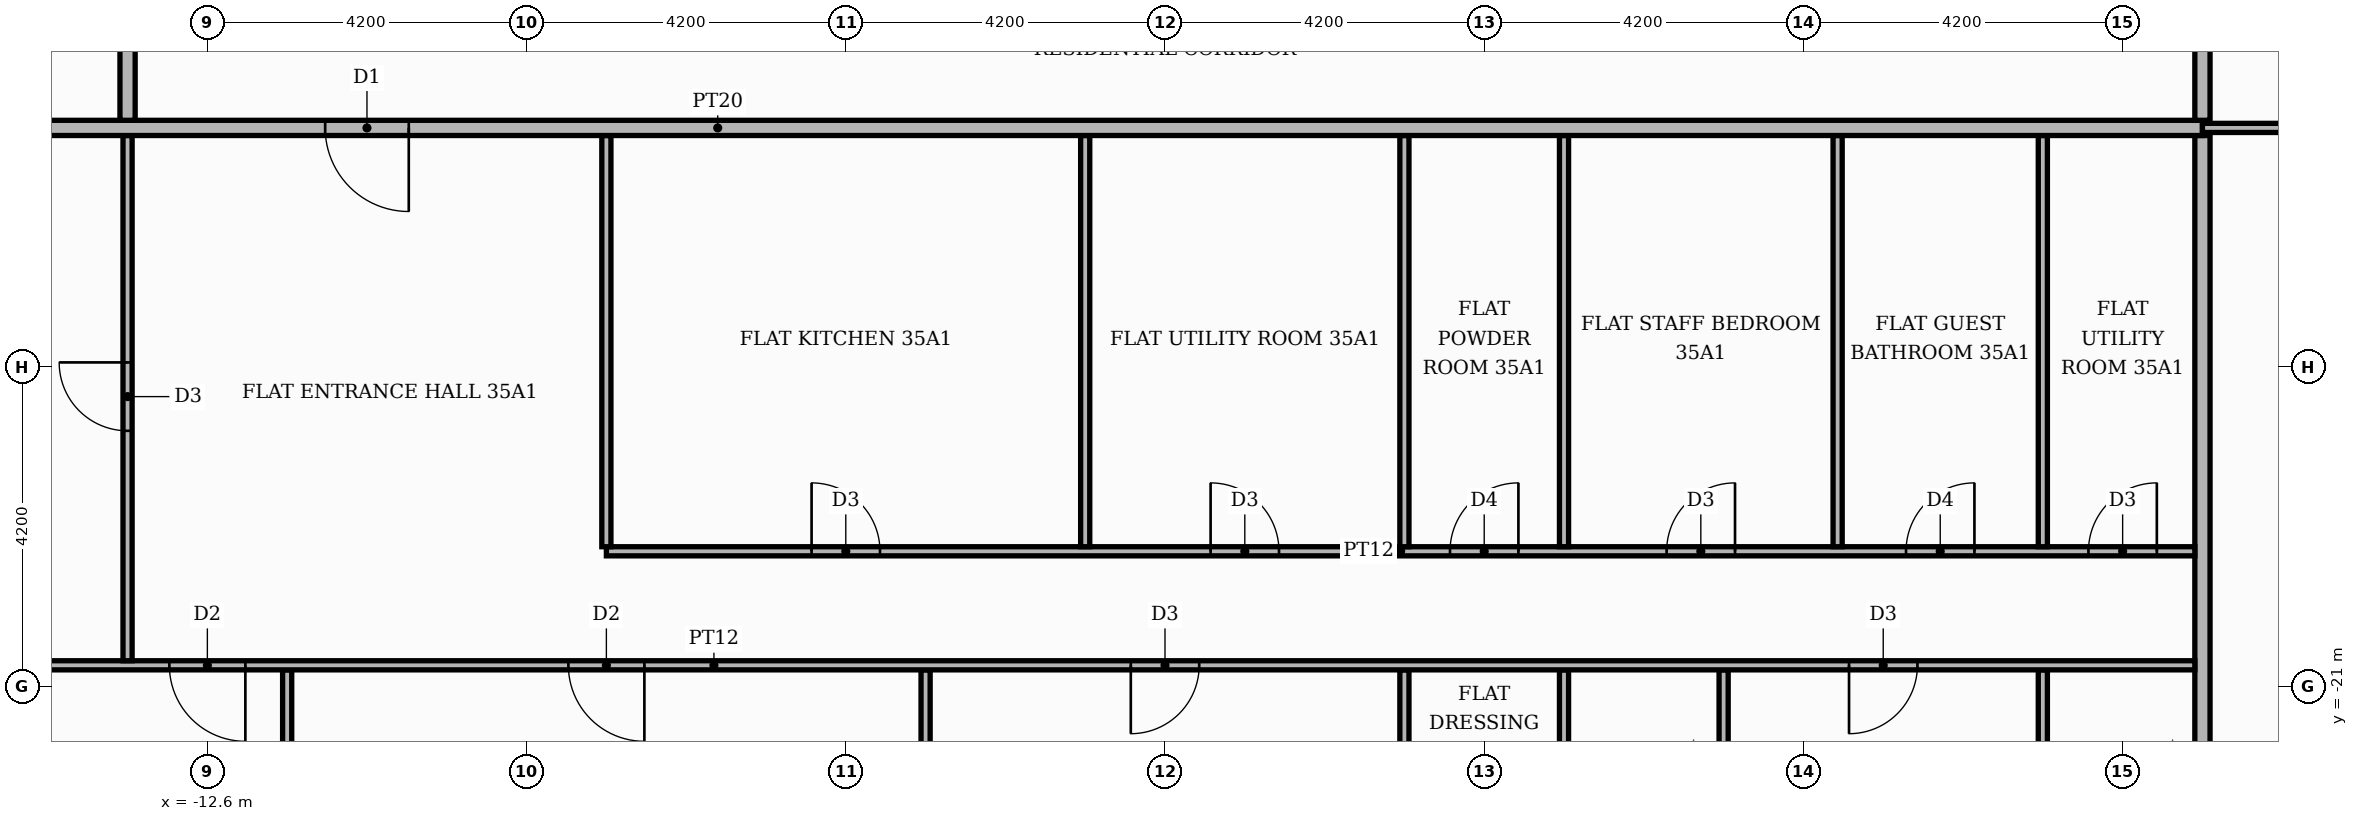
"""IFC4 building model, lengths in metres.
Left out: names, types, materials, properties, quantities, classifications, styles, units other than length and angle.
Written with IfcOpenShell. Run it as: python <this file> out.ifc"""

import sys

from ifc_helpers import new_model, si_unit, direction, frame, frame_2d, origin, place, context, subcontext, project, spatial, rectangle, extrude, element, fill, save


model = new_model("IFC4")
c1 = context("Model", 3, precision=1e-05, world=origin(), true_north=direction((0.0, 1.0)))
c2 = subcontext(c1, "Body", "Model", "MODEL_VIEW")
j1 = project(units=[si_unit("LENGTHUNIT", "METRE"), si_unit("PLANEANGLEUNIT", "RADIAN")], contexts=[c1])
p1 = place(None, origin())
s1 = spatial("IfcSite", under=j1, at=p1, CompositionType="ELEMENT")
p2 = place(p1, origin())
s2 = spatial("IfcBuilding", under=s1, at=p2, CompositionType="ELEMENT")
p3 = place(p2, frame((0.0, 0.0, 149.4)))
s3 = spatial("IfcBuildingStorey", under=s2, at=p3, CompositionType="ELEMENT", Elevation=149.4)
for number, where, z_axis, x_axis in (
    (1, (-11.55, -25.42, 0.0), (0.0, 0.0, 1.0), (0.0, 1.0, 0.0)),
    (2, (-3.15, -25.42, 0.0), (0.0, 0.0, 1.0), (0.0, 1.0, 0.0)),
):
    element("IfcWall", number, at=place(p3, frame(where, z_axis=z_axis, x_axis=x_axis)), inside=s3, PredefinedType="PARTITIONING", context=c2, shape_type="SweptSolid", body=[
        extrude(rectangle(XDim=4.64, YDim=0.12, at=frame_2d((2.32, 0.0))), origin(), (0.0, 0.0, 1.0), 3.48),
    ])
p4 = place(p3, frame((3.15, -25.42, 0.0), z_axis=(0.0, 0.0, 1.0), x_axis=(0.0, 1.0, 0.0)))
e3 = element("IfcWall", 3, at=p4, inside=s3, PredefinedType="PARTITIONING", context=c2, shape_type="SweptSolid", body=[
    extrude(rectangle(XDim=4.64, YDim=0.12, at=frame_2d((2.32, 0.0))), origin(), (0.0, 0.0, 1.0), 3.48),
])
p5 = place(p4, frame((1.75, 0.0, 0.0)))
e4 = element("IfcOpeningElement", 4, at=p5, cuts=e3, PredefinedType="OPENING", context=c2, shape_type="SweptSolid", body=[
    extrude(rectangle(XDim=0.9, YDim=2.1, at=frame_2d((0.45, 1.05))), frame((0.0, 0.07, 0.0), z_axis=(0.0, -1.0, 0.0), x_axis=(1.0, 0.0, 0.0)), (0.0, 0.0, 1.0), 0.14),
])
p6 = place(p3, frame((5.25, -25.42, 0.0), z_axis=(0.0, 0.0, 1.0), x_axis=(0.0, 1.0, 0.0)))
e5 = element("IfcWall", 5, at=p6, inside=s3, PredefinedType="PARTITIONING", context=c2, shape_type="SweptSolid", body=[
    extrude(rectangle(XDim=4.64, YDim=0.12, at=frame_2d((2.32, 0.0))), origin(), (0.0, 0.0, 1.0), 3.48),
])
p7 = place(p6, frame((1.75, 0.0, 0.0)))
e6 = element("IfcOpeningElement", 6, at=p7, cuts=e5, PredefinedType="OPENING", context=c2, shape_type="SweptSolid", body=[
    extrude(rectangle(XDim=0.9, YDim=2.1, at=frame_2d((0.45, 1.05))), frame((0.0, 0.07, 0.0), z_axis=(0.0, -1.0, 0.0), x_axis=(1.0, 0.0, 0.0)), (0.0, 0.0, 1.0), 0.14),
])
p8 = place(p3, frame((7.35, -25.42, 0.0), z_axis=(0.0, 0.0, 1.0), x_axis=(0.0, 1.0, 0.0)))
e7 = element("IfcWall", 7, at=p8, inside=s3, PredefinedType="PARTITIONING", context=c2, shape_type="SweptSolid", body=[
    extrude(rectangle(XDim=4.64, YDim=0.12, at=frame_2d((2.32, 0.0))), origin(), (0.0, 0.0, 1.0), 3.48),
])
p9 = place(p3, frame((11.55, -25.42, 0.0), z_axis=(0.0, 0.0, 1.0), x_axis=(0.0, 1.0, 0.0)))
e8 = element("IfcWall", 8, at=p9, inside=s3, PredefinedType="PARTITIONING", context=c2, shape_type="SweptSolid", body=[
    extrude(rectangle(XDim=4.64, YDim=0.12, at=frame_2d((2.32, 0.0))), origin(), (0.0, 0.0, 1.0), 3.48),
])
p10 = place(p9, frame((1.75, 0.0, 0.0)))
e9 = element("IfcOpeningElement", 9, at=p10, cuts=e8, PredefinedType="OPENING", context=c2, shape_type="SweptSolid", body=[
    extrude(rectangle(XDim=0.9, YDim=2.1, at=frame_2d((0.45, 1.05))), frame((0.0, 0.07, 0.0), z_axis=(0.0, -1.0, 0.0), x_axis=(1.0, 0.0, 0.0)), (0.0, 0.0, 1.0), 0.14),
])
p11 = place(p3, frame((13.65, -25.42, 0.0), z_axis=(0.0, 0.0, 1.0), x_axis=(0.0, 1.0, 0.0)))
e10 = element("IfcWall", 10, at=p11, inside=s3, PredefinedType="PARTITIONING", context=c2, shape_type="SweptSolid", body=[
    extrude(rectangle(XDim=11.67, YDim=0.2, at=frame_2d((5.835, 0.0))), origin(), (0.0, 0.0, 1.0), 3.48),
])
p12 = place(p3, frame((-25.42, -20.72, 0.0), z_axis=(0.0, 0.0, 1.0), x_axis=(1.0, 0.0, 0.0)))
e11 = element("IfcWall", 11, at=p12, inside=s3, PredefinedType="PARTITIONING", context=c2, shape_type="SweptSolid", body=[
    extrude(rectangle(XDim=38.97, YDim=0.12, at=frame_2d((19.485, 0.0))), origin(), (0.0, 0.0, 1.0), 3.48),
])
p13 = place(p12, frame((12.32, 0.0, 0.0)))
e12 = element("IfcOpeningElement", 12, at=p13, cuts=e11, PredefinedType="OPENING", context=c2, shape_type="SweptSolid", body=[
    extrude(rectangle(XDim=1.0, YDim=2.1, at=frame_2d((0.5, 1.05))), frame((0.0, 0.07, 0.0), z_axis=(0.0, -1.0, 0.0), x_axis=(1.0, 0.0, 0.0)), (0.0, 0.0, 1.0), 0.14),
])
p14 = place(p12, frame((17.57, 0.0, 0.0)))
e13 = element("IfcOpeningElement", 13, at=p14, cuts=e11, PredefinedType="OPENING", context=c2, shape_type="SweptSolid", body=[
    extrude(rectangle(XDim=1.0, YDim=2.1, at=frame_2d((0.5, 1.05))), frame((0.0, 0.07, 0.0), z_axis=(0.0, -1.0, 0.0), x_axis=(1.0, 0.0, 0.0)), (0.0, 0.0, 1.0), 0.14),
])
p15 = place(p12, frame((24.97, 0.0, 0.0)))
e14 = element("IfcOpeningElement", 14, at=p15, cuts=e11, PredefinedType="OPENING", context=c2, shape_type="SweptSolid", body=[
    extrude(rectangle(XDim=0.9, YDim=2.1, at=frame_2d((0.45, 1.05))), frame((0.0, 0.07, 0.0), z_axis=(0.0, -1.0, 0.0), x_axis=(1.0, 0.0, 0.0)), (0.0, 0.0, 1.0), 0.14),
])
p16 = place(p12, frame((34.42, 0.0, 0.0)))
e15 = element("IfcOpeningElement", 15, at=p16, cuts=e11, PredefinedType="OPENING", context=c2, shape_type="SweptSolid", body=[
    extrude(rectangle(XDim=0.9, YDim=2.1, at=frame_2d((0.45, 1.05))), frame((0.0, 0.07, 0.0), z_axis=(0.0, -1.0, 0.0), x_axis=(1.0, 0.0, 0.0)), (0.0, 0.0, 1.0), 0.14),
])
p17 = place(p3, frame((-13.65, -20.66, 0.0), z_axis=(0.0, 0.0, 1.0), x_axis=(0.0, 1.0, 0.0)))
e16 = element("IfcWall", 16, at=p17, inside=s3, PredefinedType="PARTITIONING", context=c2, shape_type="SweptSolid", body=[
    extrude(rectangle(XDim=6.91, YDim=0.12, at=frame_2d((3.455, 0.0))), origin(), (0.0, 0.0, 1.0), 3.48),
])
p18 = place(p17, frame((3.025, 0.0, 0.0)))
e17 = element("IfcOpeningElement", 17, at=p18, cuts=e16, PredefinedType="OPENING", context=c2, shape_type="SweptSolid", body=[
    extrude(rectangle(XDim=0.9, YDim=2.1, at=frame_2d((0.45, 1.05))), frame((0.0, 0.07, 0.0), z_axis=(0.0, -1.0, 0.0), x_axis=(1.0, 0.0, 0.0)), (0.0, 0.0, 1.0), 0.14),
])
p19 = place(p3, frame((-7.35, -19.22, 0.0), z_axis=(0.0, 0.0, 1.0), x_axis=(1.0, 0.0, 0.0)))
e18 = element("IfcWall", 18, at=p19, inside=s3, PredefinedType="PARTITIONING", context=c2, shape_type="SweptSolid", body=[
    extrude(rectangle(XDim=20.9, YDim=0.12, at=frame_2d((10.45, 0.0))), origin(), (0.0, 0.0, 1.0), 3.48),
])
p20 = place(p19, frame((2.7, 0.0, 0.0)))
e19 = element("IfcOpeningElement", 19, at=p20, cuts=e18, PredefinedType="OPENING", context=c2, shape_type="SweptSolid", body=[
    extrude(rectangle(XDim=0.9, YDim=2.1, at=frame_2d((0.45, 1.05))), frame((0.0, 0.07, 0.0), z_axis=(0.0, -1.0, 0.0), x_axis=(1.0, 0.0, 0.0)), (0.0, 0.0, 1.0), 0.14),
])
p21 = place(p19, frame((7.95, 0.0, 0.0)))
e20 = element("IfcOpeningElement", 20, at=p21, cuts=e18, PredefinedType="OPENING", context=c2, shape_type="SweptSolid", body=[
    extrude(rectangle(XDim=0.9, YDim=2.1, at=frame_2d((0.45, 1.05))), frame((0.0, 0.07, 0.0), z_axis=(0.0, -1.0, 0.0), x_axis=(1.0, 0.0, 0.0)), (0.0, 0.0, 1.0), 0.14),
])
p22 = place(p19, frame((11.1, 0.0, 0.0)))
e21 = element("IfcOpeningElement", 21, at=p22, cuts=e18, PredefinedType="OPENING", context=c2, shape_type="SweptSolid", body=[
    extrude(rectangle(XDim=0.9, YDim=2.1, at=frame_2d((0.45, 1.05))), frame((0.0, 0.07, 0.0), z_axis=(0.0, -1.0, 0.0), x_axis=(1.0, 0.0, 0.0)), (0.0, 0.0, 1.0), 0.14),
])
p23 = place(p19, frame((13.95, 0.0, 0.0)))
e22 = element("IfcOpeningElement", 22, at=p23, cuts=e18, PredefinedType="OPENING", context=c2, shape_type="SweptSolid", body=[
    extrude(rectangle(XDim=0.9, YDim=2.1, at=frame_2d((0.45, 1.05))), frame((0.0, 0.07, 0.0), z_axis=(0.0, -1.0, 0.0), x_axis=(1.0, 0.0, 0.0)), (0.0, 0.0, 1.0), 0.14),
])
p24 = place(p19, frame((17.1, 0.0, 0.0)))
e23 = element("IfcOpeningElement", 23, at=p24, cuts=e18, PredefinedType="OPENING", context=c2, shape_type="SweptSolid", body=[
    extrude(rectangle(XDim=0.9, YDim=2.1, at=frame_2d((0.45, 1.05))), frame((0.0, 0.07, 0.0), z_axis=(0.0, -1.0, 0.0), x_axis=(1.0, 0.0, 0.0)), (0.0, 0.0, 1.0), 0.14),
])
p25 = place(p19, frame((19.5, 0.0, 0.0)))
e24 = element("IfcOpeningElement", 24, at=p25, cuts=e18, PredefinedType="OPENING", context=c2, shape_type="SweptSolid", body=[
    extrude(rectangle(XDim=0.9, YDim=2.1, at=frame_2d((0.45, 1.05))), frame((0.0, 0.07, 0.0), z_axis=(0.0, -1.0, 0.0), x_axis=(1.0, 0.0, 0.0)), (0.0, 0.0, 1.0), 0.14),
])
for number, where, z_axis, x_axis in (
    (25, (-7.35, -19.16, 0.0), (0.0, 0.0, 1.0), (0.0, 1.0, 0.0)),
    (26, (-1.05, -19.16, 0.0), (0.0, 0.0, 1.0), (0.0, 1.0, 0.0)),
    (27, (3.15, -19.16, 0.0), (0.0, 0.0, 1.0), (0.0, 1.0, 0.0)),
    (28, (5.25, -19.16, 0.0), (0.0, 0.0, 1.0), (0.0, 1.0, 0.0)),
    (29, (8.85, -19.16, 0.0), (0.0, 0.0, 1.0), (0.0, 1.0, 0.0)),
    (30, (11.55, -19.16, 0.0), (0.0, 0.0, 1.0), (0.0, 1.0, 0.0)),
):
    element("IfcWall", number, at=place(p3, frame(where, z_axis=z_axis, x_axis=x_axis)), inside=s3, PredefinedType="PARTITIONING", context=c2, shape_type="SweptSolid", body=[
        extrude(rectangle(XDim=5.41, YDim=0.12, at=frame_2d((2.705, 0.0))), origin(), (0.0, 0.0, 1.0), 3.48),
    ])
p26 = place(p3, frame((-25.42, -13.65, 0.0), z_axis=(0.0, 0.0, 1.0), x_axis=(1.0, 0.0, 0.0)))
e31 = element("IfcWall", 31, at=p26, inside=s3, PredefinedType="PARTITIONING", context=c2, shape_type="SweptSolid", body=[
    extrude(rectangle(XDim=39.07, YDim=0.2, at=frame_2d((19.535, 0.0))), origin(), (0.0, 0.0, 1.0), 3.48),
])
p27 = place(p26, frame((14.37, 0.0, 0.0)))
e32 = element("IfcOpeningElement", 32, at=p27, cuts=e31, PredefinedType="OPENING", context=c2, shape_type="SweptSolid", body=[
    extrude(rectangle(XDim=1.1, YDim=2.4, at=frame_2d((0.55, 1.2))), frame((0.0, 0.11, 0.0), z_axis=(0.0, -1.0, 0.0), x_axis=(1.0, 0.0, 0.0)), (0.0, 0.0, 1.0), 0.22),
])
p28 = place(p3, frame((13.65, -13.65, 0.0), z_axis=(0.0, 0.0, 1.0), x_axis=(1.0, 0.0, 0.0)))
e33 = element("IfcWall", 33, at=p28, inside=s3, PredefinedType="PARTITIONING", context=c2, shape_type="SweptSolid", body=[
    extrude(rectangle(XDim=6.17, YDim=0.12, at=frame_2d((3.085, 0.0))), origin(), (0.0, 0.0, 1.0), 3.48),
])
p29 = place(p28, frame((2.635, 0.0, 0.0)))
e34 = element("IfcOpeningElement", 34, at=p29, cuts=e33, PredefinedType="OPENING", context=c2, shape_type="SweptSolid", body=[
    extrude(rectangle(XDim=0.9, YDim=2.1, at=frame_2d((0.45, 1.05))), frame((0.0, 0.07, 0.0), z_axis=(0.0, -1.0, 0.0), x_axis=(1.0, 0.0, 0.0)), (0.0, 0.0, 1.0), 0.14),
])
for number, where, z_axis, x_axis in (
    (35, (-13.65, -13.55, 0.0), (0.0, 0.0, 1.0), (0.0, 1.0, 0.0)),
    (36, (13.65, -13.55, 0.0), (0.0, 0.0, 1.0), (0.0, 1.0, 0.0)),
):
    element("IfcWall", number, at=place(p3, frame(where, z_axis=z_axis, x_axis=x_axis)), inside=s3, PredefinedType="PARTITIONING", context=c2, shape_type="SweptSolid", body=[
        extrude(rectangle(XDim=2.45, YDim=0.2, at=frame_2d((1.225, 0.0))), origin(), (0.0, 0.0, 1.0), 3.48),
    ])
p30 = place(p27, frame((1.1, 0.0, 0.0), z_axis=(0.0, 0.0, 1.0), x_axis=(-1.0, 0.0, 0.0)))
e37 = element("IfcDoor", 37, at=p30, inside=s3, OperationType="SINGLE_SWING_RIGHT", PredefinedType="DOOR", context=c2, shape_type="SweptSolid", body=[
    extrude(rectangle(XDim=1.1, YDim=2.4, at=frame_2d((0.55, 1.2))), frame((0.0, 0.025, 0.0), z_axis=(0.0, -1.0, 0.0), x_axis=(1.0, 0.0, 0.0)), (0.0, 0.0, 1.0), 0.05),
])
fill(e32, e37)
p31 = place(p18, origin())
e38 = element("IfcDoor", 38, at=p31, inside=s3, OperationType="SINGLE_SWING_RIGHT", PredefinedType="DOOR", context=c2, shape_type="SweptSolid", body=[
    extrude(rectangle(XDim=0.9, YDim=2.1, at=frame_2d((0.45, 1.05))), frame((0.0, 0.025, 0.0), z_axis=(0.0, -1.0, 0.0), x_axis=(1.0, 0.0, 0.0)), (0.0, 0.0, 1.0), 0.05),
])
fill(e17, e38)
p32 = place(p20, origin())
e39 = element("IfcDoor", 39, at=p32, inside=s3, OperationType="SINGLE_SWING_LEFT", PredefinedType="DOOR", context=c2, shape_type="SweptSolid", body=[
    extrude(rectangle(XDim=0.9, YDim=2.1, at=frame_2d((0.45, 1.05))), frame((0.0, 0.025, 0.0), z_axis=(0.0, -1.0, 0.0), x_axis=(1.0, 0.0, 0.0)), (0.0, 0.0, 1.0), 0.05),
])
fill(e19, e39)
p33 = place(p21, origin())
e40 = element("IfcDoor", 40, at=p33, inside=s3, OperationType="SINGLE_SWING_LEFT", PredefinedType="DOOR", context=c2, shape_type="SweptSolid", body=[
    extrude(rectangle(XDim=0.9, YDim=2.1, at=frame_2d((0.45, 1.05))), frame((0.0, 0.025, 0.0), z_axis=(0.0, -1.0, 0.0), x_axis=(1.0, 0.0, 0.0)), (0.0, 0.0, 1.0), 0.05),
])
fill(e20, e40)
p34 = place(p22, origin())
e41 = element("IfcDoor", 41, at=p34, inside=s3, OperationType="SINGLE_SWING_RIGHT", PredefinedType="DOOR", context=c2, shape_type="SweptSolid", body=[
    extrude(rectangle(XDim=0.9, YDim=2.1, at=frame_2d((0.45, 1.05))), frame((0.0, 0.025, 0.0), z_axis=(0.0, -1.0, 0.0), x_axis=(1.0, 0.0, 0.0)), (0.0, 0.0, 1.0), 0.05),
])
fill(e21, e41)
p35 = place(p23, origin())
e42 = element("IfcDoor", 42, at=p35, inside=s3, OperationType="SINGLE_SWING_RIGHT", PredefinedType="DOOR", context=c2, shape_type="SweptSolid", body=[
    extrude(rectangle(XDim=0.9, YDim=2.1, at=frame_2d((0.45, 1.05))), frame((0.0, 0.025, 0.0), z_axis=(0.0, -1.0, 0.0), x_axis=(1.0, 0.0, 0.0)), (0.0, 0.0, 1.0), 0.05),
])
fill(e22, e42)
p36 = place(p24, origin())
e43 = element("IfcDoor", 43, at=p36, inside=s3, OperationType="SINGLE_SWING_RIGHT", PredefinedType="DOOR", context=c2, shape_type="SweptSolid", body=[
    extrude(rectangle(XDim=0.9, YDim=2.1, at=frame_2d((0.45, 1.05))), frame((0.0, 0.025, 0.0), z_axis=(0.0, -1.0, 0.0), x_axis=(1.0, 0.0, 0.0)), (0.0, 0.0, 1.0), 0.05),
])
fill(e23, e43)
p37 = place(p25, origin())
e44 = element("IfcDoor", 44, at=p37, inside=s3, OperationType="SINGLE_SWING_RIGHT", PredefinedType="DOOR", context=c2, shape_type="SweptSolid", body=[
    extrude(rectangle(XDim=0.9, YDim=2.1, at=frame_2d((0.45, 1.05))), frame((0.0, 0.025, 0.0), z_axis=(0.0, -1.0, 0.0), x_axis=(1.0, 0.0, 0.0)), (0.0, 0.0, 1.0), 0.05),
])
fill(e24, e44)
p38 = place(p13, frame((1.0, 0.0, 0.0), z_axis=(0.0, 0.0, 1.0), x_axis=(-1.0, 0.0, 0.0)))
e45 = element("IfcDoor", 45, at=p38, inside=s3, OperationType="SINGLE_SWING_RIGHT", PredefinedType="DOOR", context=c2, shape_type="SweptSolid", body=[
    extrude(rectangle(XDim=1.0, YDim=2.1, at=frame_2d((0.5, 1.05))), frame((0.0, 0.025, 0.0), z_axis=(0.0, -1.0, 0.0), x_axis=(1.0, 0.0, 0.0)), (0.0, 0.0, 1.0), 0.05),
])
fill(e12, e45)
p39 = place(p14, frame((1.0, 0.0, 0.0), z_axis=(0.0, 0.0, 1.0), x_axis=(-1.0, 0.0, 0.0)))
e46 = element("IfcDoor", 46, at=p39, inside=s3, OperationType="SINGLE_SWING_RIGHT", PredefinedType="DOOR", context=c2, shape_type="SweptSolid", body=[
    extrude(rectangle(XDim=1.0, YDim=2.1, at=frame_2d((0.5, 1.05))), frame((0.0, 0.025, 0.0), z_axis=(0.0, -1.0, 0.0), x_axis=(1.0, 0.0, 0.0)), (0.0, 0.0, 1.0), 0.05),
])
fill(e13, e46)
p40 = place(p15, frame((0.9, 0.0, 0.0), z_axis=(0.0, 0.0, 1.0), x_axis=(-1.0, 0.0, 0.0)))
e47 = element("IfcDoor", 47, at=p40, inside=s3, OperationType="SINGLE_SWING_LEFT", PredefinedType="DOOR", context=c2, shape_type="SweptSolid", body=[
    extrude(rectangle(XDim=0.9, YDim=2.1, at=frame_2d((0.45, 1.05))), frame((0.0, 0.025, 0.0), z_axis=(0.0, -1.0, 0.0), x_axis=(1.0, 0.0, 0.0)), (0.0, 0.0, 1.0), 0.05),
])
fill(e14, e47)
p41 = place(p16, frame((0.9, 0.0, 0.0), z_axis=(0.0, 0.0, 1.0), x_axis=(-1.0, 0.0, 0.0)))
e48 = element("IfcDoor", 48, at=p41, inside=s3, OperationType="SINGLE_SWING_LEFT", PredefinedType="DOOR", context=c2, shape_type="SweptSolid", body=[
    extrude(rectangle(XDim=0.9, YDim=2.1, at=frame_2d((0.45, 1.05))), frame((0.0, 0.025, 0.0), z_axis=(0.0, -1.0, 0.0), x_axis=(1.0, 0.0, 0.0)), (0.0, 0.0, 1.0), 0.05),
])
fill(e15, e48)
save(model, sys.argv[1])
